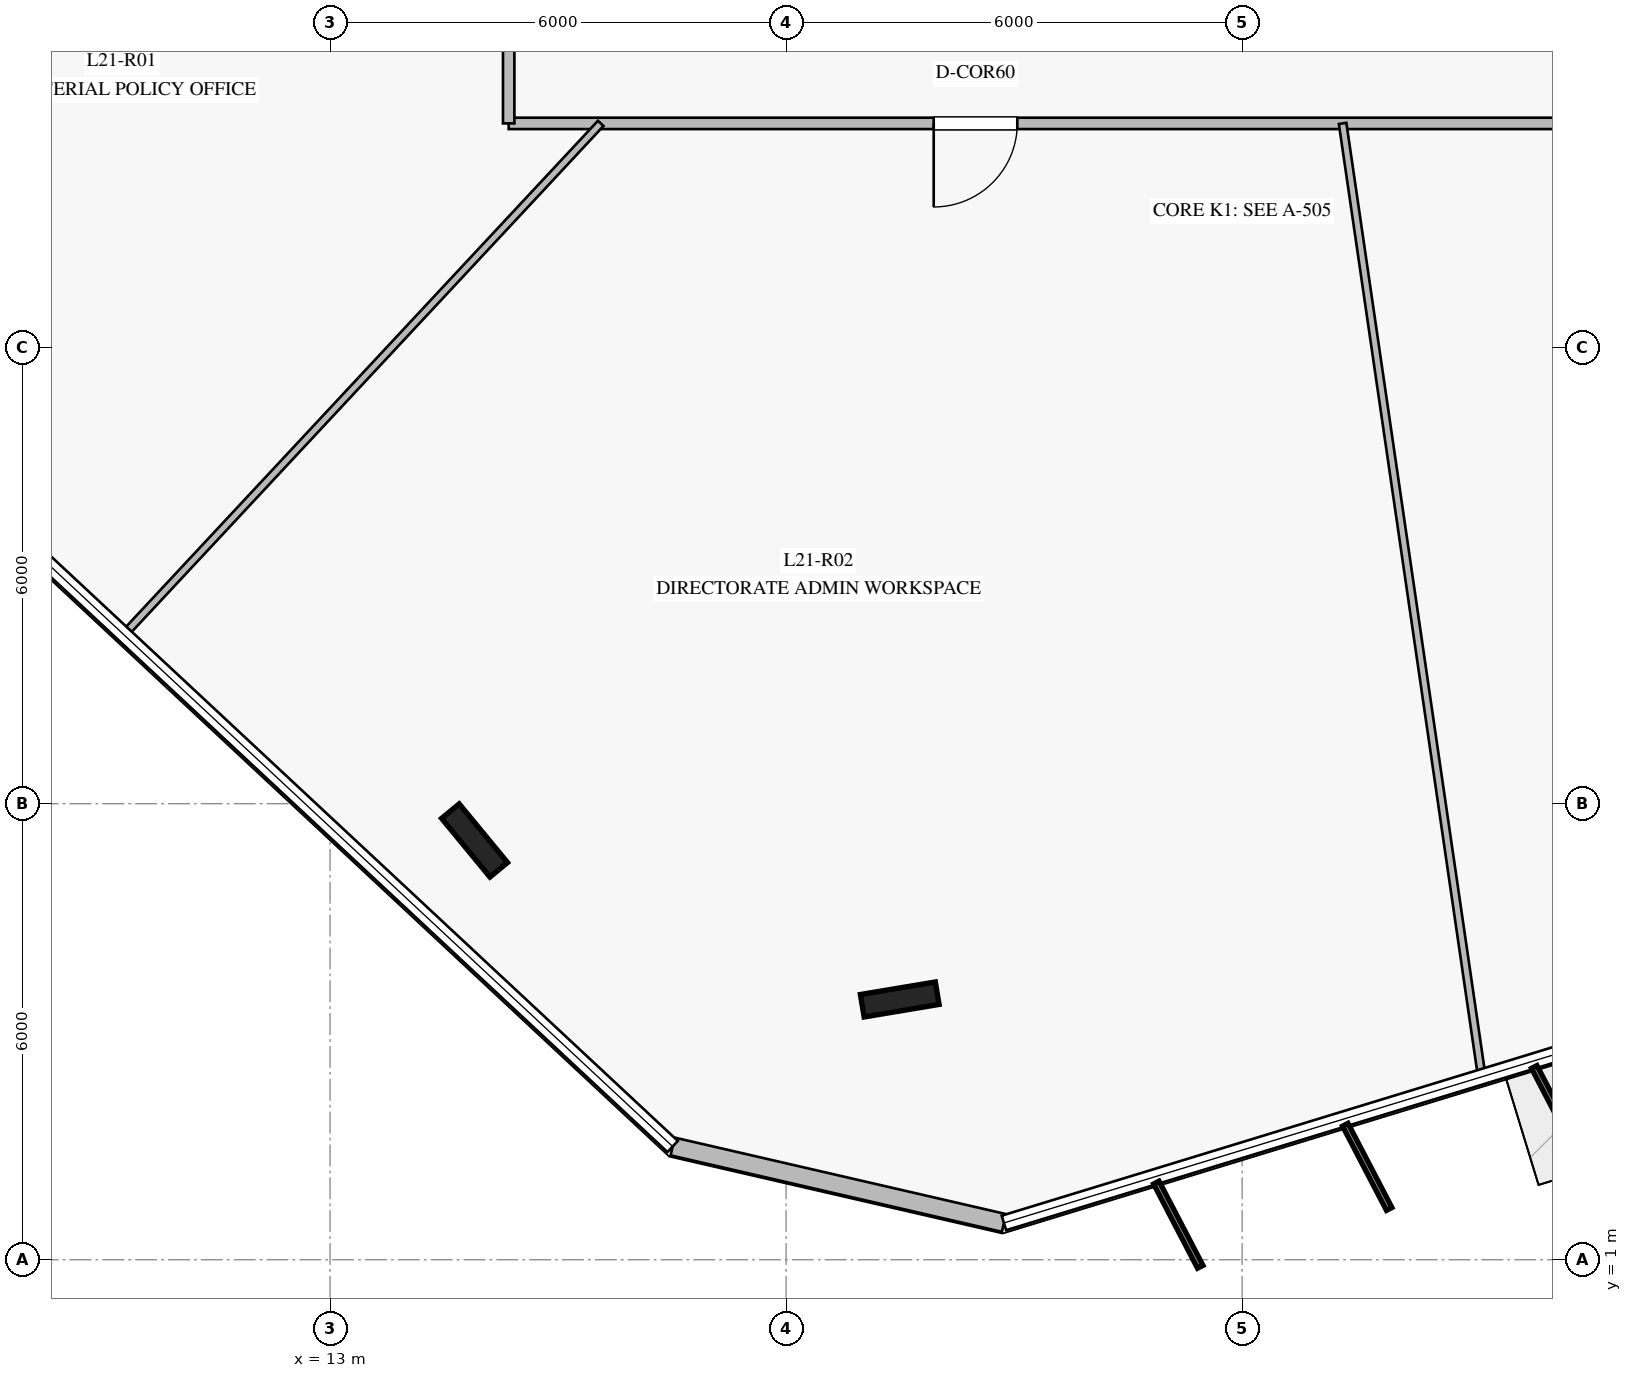
"""IFC4 building model, lengths in metres.
Left out: names, types, materials, properties, quantities, classifications, styles, units other than length and angle.
Written with IfcOpenShell. Run it as: python <this file> out.ifc"""

import sys

from ifc_helpers import new_model, si_unit, direction, frame, frame_2d, origin, origin_2d, place, context, subcontext, project, spatial, rectangle, i_section, extrude, element, fill, save


model = new_model("IFC4")
c1 = context("Model", 3, precision=1e-05, world=origin(), true_north=direction((0.0, 1.0)))
c2 = subcontext(c1, "Body", "Model", "MODEL_VIEW")
j1 = project(units=[si_unit("LENGTHUNIT", "METRE"), si_unit("PLANEANGLEUNIT", "RADIAN")], contexts=[c1])
p1 = place(None, origin())
s1 = spatial("IfcSite", under=j1, at=p1, CompositionType="ELEMENT")
p2 = place(p1, origin())
s2 = spatial("IfcBuilding", under=s1, at=p2, CompositionType="ELEMENT")
p3 = place(p2, frame((0.0, 0.0, 88.0)))
s3 = spatial("IfcBuildingStorey", under=s2, at=p3, CompositionType="ELEMENT", Elevation=88.0)
for number, where, z_axis, x_axis in (
    (1, (14.901, 6.516, 0.0), (0.0, 0.0, 1.0), (-0.636, 0.772, 0.0)),
    (2, (20.495, 4.424, 0.0), (0.0, 0.0, 1.0), (0.986, 0.165, 0.0)),
):
    element("IfcColumn", number, at=place(p3, frame(where, z_axis=z_axis, x_axis=x_axis)), inside=s3, PredefinedType="COLUMN", context=c2, shape_type="SweptSolid", body=[
        extrude(i_section(OverallWidth=0.3, OverallDepth=1.0, WebThickness=0.019, FlangeThickness=0.036, at=origin_2d()), origin(), (0.0, 0.0, 1.0), 4.0),
    ])
p4 = place(p3, frame((17.507, 2.49, 0.0), z_axis=(0.0, 0.0, 1.0), x_axis=(0.974381076881, -0.224903350388, 0.0)))
e3 = element("IfcWall", 3, at=p4, inside=s3, PredefinedType="STANDARD", context=c2, shape_type="SweptSolid", body=[
    extrude(rectangle(XDim=4.473, YDim=0.24, at=frame_2d((2.237, 0.0))), origin(), (0.0, 0.0, 1.0), 3.7),
])
p5 = place(p3, frame((34.65, 15.95, 0.0), z_axis=(0.0, 0.0, 1.0), x_axis=(-1.0, 0.0, 0.0)))
e4 = element("IfcWall", 4, at=p5, inside=s3, PredefinedType="PARTITIONING", context=c2, shape_type="SweptSolid", body=[
    extrude(rectangle(XDim=19.3, YDim=0.15, at=frame_2d((9.65, 0.0))), origin(), (0.0, 0.0, 1.0), 3.15),
])
p6 = place(p5, frame((12.608, 0.0, 0.0)))
e5 = element("IfcOpeningElement", 5, at=p6, cuts=e4, PredefinedType="OPENING", context=c2, shape_type="SweptSolid", body=[
    extrude(rectangle(XDim=1.1, YDim=2.2, at=frame_2d((0.55, 1.1))), frame((0.0, 0.085, 0.0), z_axis=(0.0, -1.0, 0.0), x_axis=(1.0, 0.0, 0.0)), (0.0, 0.0, 1.0), 0.17),
])
p7 = place(p3, frame((15.35, 15.95, 0.0), z_axis=(0.0, 0.0, 1.0), x_axis=(0.0, 1.0, 0.0)))
e6 = element("IfcWall", 6, at=p7, inside=s3, PredefinedType="PARTITIONING", context=c2, shape_type="SweptSolid", body=[
    extrude(rectangle(XDim=18.1, YDim=0.15, at=frame_2d((9.05, 0.0))), origin(), (0.0, 0.0, 1.0), 3.15),
])
p8 = place(p7, frame((4.079, 0.0, 0.0)))
e7 = element("IfcOpeningElement", 7, at=p8, cuts=e6, PredefinedType="OPENING", context=c2, shape_type="SweptSolid", body=[
    extrude(rectangle(XDim=1.1, YDim=2.2, at=frame_2d((0.55, 1.1))), frame((0.0, 0.085, 0.0), z_axis=(0.0, -1.0, 0.0), x_axis=(1.0, 0.0, 0.0)), (0.0, 0.0, 1.0), 0.17),
])
p9 = place(p7, frame((12.762, 0.0, 0.0)))
e8 = element("IfcOpeningElement", 8, at=p9, cuts=e6, PredefinedType="OPENING", context=c2, shape_type="SweptSolid", body=[
    extrude(rectangle(XDim=1.1, YDim=2.2, at=frame_2d((0.55, 1.1))), frame((0.0, 0.085, 0.0), z_axis=(0.0, -1.0, 0.0), x_axis=(1.0, 0.0, 0.0)), (0.0, 0.0, 1.0), 0.17),
])
p10 = place(p3, frame((16.561, 15.95, 0.0), z_axis=(0.0, 0.0, 1.0), x_axis=(-0.682067130349, -0.731289566244, 0.0)))
e9 = element("IfcWall", 9, at=p10, inside=s3, PredefinedType="MOVABLE", context=c2, shape_type="SweptSolid", body=[
    extrude(rectangle(XDim=9.181, YDim=0.1, at=frame_2d((4.59, 0.0))), origin(), (0.0, 0.0, 1.0), 3.0),
])
p11 = place(p3, frame((26.322, 15.95, 0.0), z_axis=(0.0, 0.0, 1.0), x_axis=(0.144474493425, -0.989508524849, 0.0)))
e10 = element("IfcWall", 10, at=p11, inside=s3, PredefinedType="MOVABLE", context=c2, shape_type="SweptSolid", body=[
    extrude(rectangle(XDim=12.659, YDim=0.1, at=frame_2d((6.329, 0.0))), origin(), (0.0, 0.0, 1.0), 3.0),
])
p12 = place(p6, origin())
e11 = element("IfcDoor", 11, at=p12, inside=s3, OperationType="SINGLE_SWING_RIGHT", PredefinedType="DOOR", context=c2, shape_type="SweptSolid", body=[
    extrude(rectangle(XDim=1.1, YDim=2.2, at=frame_2d((0.55, 1.1))), frame((0.0, 0.025, 0.0), z_axis=(0.0, -1.0, 0.0), x_axis=(1.0, 0.0, 0.0)), (0.0, 0.0, 1.0), 0.05),
])
fill(e5, e11)
save(model, sys.argv[1])
